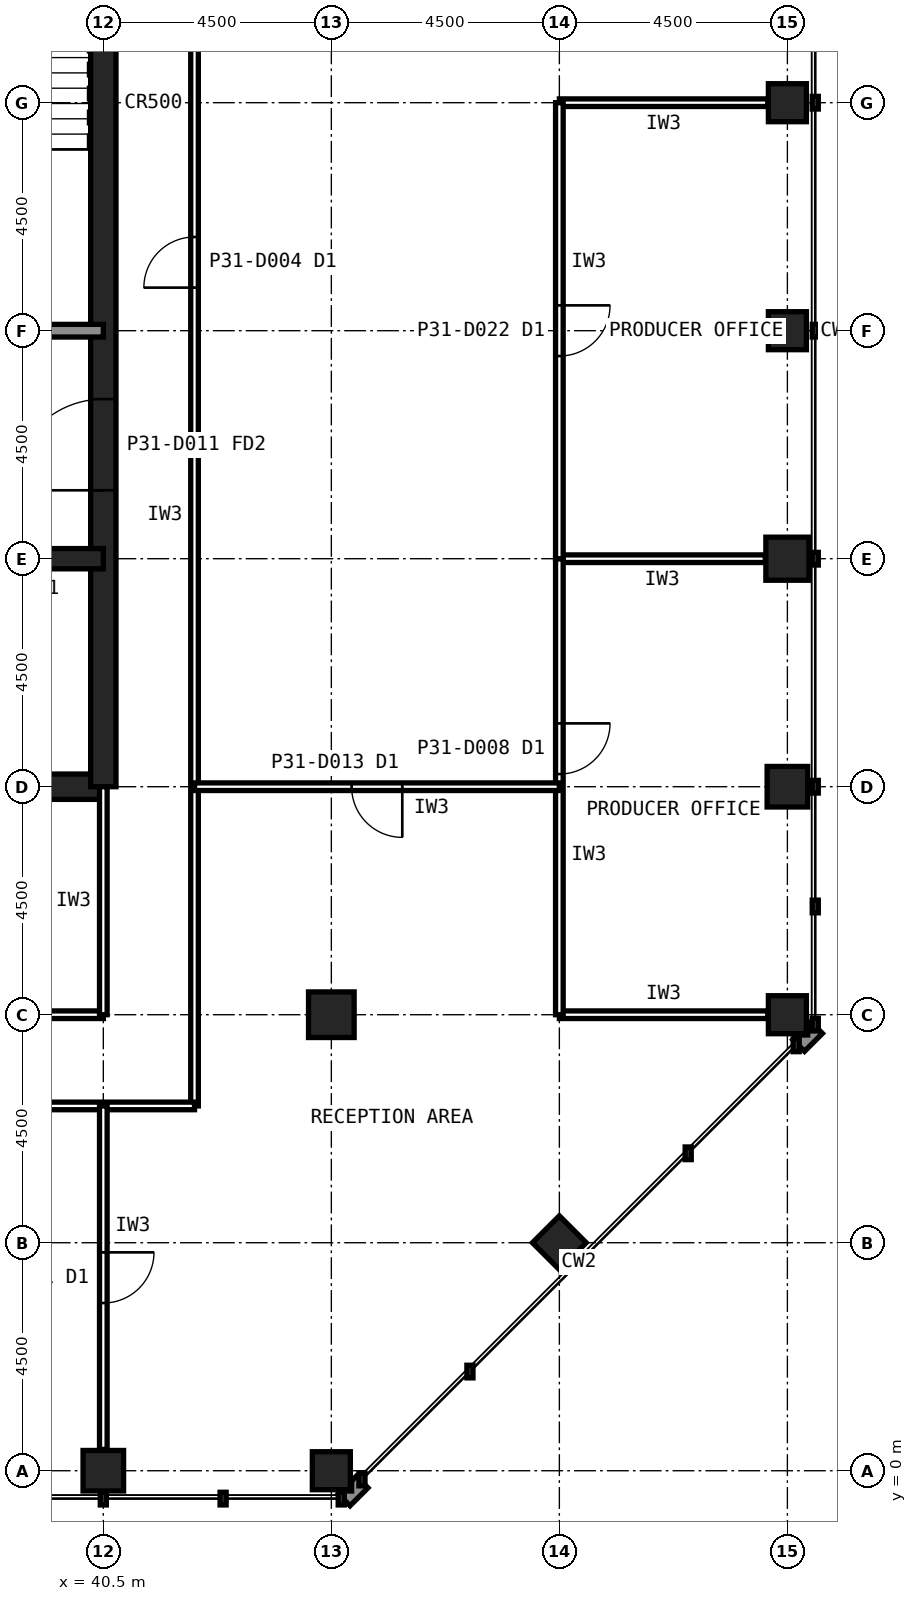
"""IFC4 building model, lengths in metres.
Left out: names, types, materials, properties, quantities, classifications, styles, units other than length and angle.
Written with IfcOpenShell. Run it as: python <this file> out.ifc"""

import sys

from ifc_helpers import new_model, si_unit, direction, frame, frame_2d, origin, origin_2d, place, context, subcontext, project, spatial, rectangle, hollow_rectangle, extrude, element, fill, save


model = new_model("IFC4")
c1 = context("Model", 3, precision=1e-05, world=origin(), true_north=direction((0.0, 1.0)))
c2 = subcontext(c1, "Body", "Model", "MODEL_VIEW")
j1 = project(units=[si_unit("LENGTHUNIT", "METRE"), si_unit("PLANEANGLEUNIT", "RADIAN")], contexts=[c1])
p1 = place(None, origin())
s1 = spatial("IfcSite", under=j1, at=p1, CompositionType="ELEMENT")
p2 = place(p1, origin())
s2 = spatial("IfcBuilding", under=s1, at=p2, CompositionType="ELEMENT")
p3 = place(p2, frame((0.0, 0.0, 135.6)))
s3 = spatial("IfcBuildingStorey", under=s2, at=p3, CompositionType="ELEMENT", Elevation=135.6)
p4 = place(p3, frame((40.5, 0.0, 0.0), z_axis=(0.0, 0.0, 1.0), x_axis=(1.0, 0.0, 0.0)))
e1 = element("IfcColumn", 1, at=p4, inside=s3, PredefinedType="COLUMN", context=c2, shape_type="SweptSolid", body=[
    extrude(hollow_rectangle(XDim=0.8, YDim=0.8, WallThickness=0.045, at=origin_2d()), origin(), (0.0, 0.0, 1.0), 4.0),
])
for number, where, z_axis, x_axis in (
    (2, (45.0, 0.0, 0.0), (0.0, 0.0, 1.0), (1.0, 0.0, 0.0)),
    (3, (54.0, 9.0, 0.0), (0.0, 0.0, 1.0), (1.0, 0.0, 0.0)),
):
    element("IfcColumn", number, at=place(p3, frame(where, z_axis=z_axis, x_axis=x_axis)), inside=s3, PredefinedType="COLUMN", context=c2, shape_type="SweptSolid", body=[
        extrude(hollow_rectangle(XDim=0.75, YDim=0.75, WallThickness=0.04, at=origin_2d()), origin(), (0.0, 0.0, 1.0), 4.0),
    ])
p5 = place(p3, frame((54.0, 13.5, 0.0), z_axis=(0.0, 0.0, 1.0), x_axis=(1.0, 0.0, 0.0)))
e4 = element("IfcColumn", 4, at=p5, inside=s3, PredefinedType="COLUMN", context=c2, shape_type="SweptSolid", body=[
    extrude(hollow_rectangle(XDim=0.8, YDim=0.8, WallThickness=0.045, at=origin_2d()), origin(), (0.0, 0.0, 1.0), 4.0),
])
p6 = place(p3, frame((54.0, 18.0, 0.0), z_axis=(0.0, 0.0, 1.0), x_axis=(1.0, 0.0, 0.0)))
e5 = element("IfcColumn", 5, at=p6, inside=s3, PredefinedType="COLUMN", context=c2, shape_type="SweptSolid", body=[
    extrude(hollow_rectangle(XDim=0.85, YDim=0.85, WallThickness=0.05, at=origin_2d()), origin(), (0.0, 0.0, 1.0), 4.0),
])
for number, where, z_axis, x_axis in (
    (6, (54.0, 22.5, 0.0), (0.0, 0.0, 1.0), (1.0, 0.0, 0.0)),
    (7, (54.0, 27.0, 0.0), (0.0, 0.0, 1.0), (1.0, 0.0, 0.0)),
    (8, (49.5, 4.5, 0.0), (0.0, 0.0, 1.0), (0.707, 0.707, 0.0)),
):
    element("IfcColumn", number, at=place(p3, frame(where, z_axis=z_axis, x_axis=x_axis)), inside=s3, PredefinedType="COLUMN", context=c2, shape_type="SweptSolid", body=[
        extrude(hollow_rectangle(XDim=0.75, YDim=0.75, WallThickness=0.04, at=origin_2d()), origin(), (0.0, 0.0, 1.0), 4.0),
    ])
p7 = place(p3, frame((45.0, 9.0, 0.0), z_axis=(0.0, 0.0, 1.0), x_axis=(1.0, 0.0, 0.0)))
e9 = element("IfcColumn", 9, at=p7, inside=s3, PredefinedType="COLUMN", context=c2, shape_type="SweptSolid", body=[
    extrude(hollow_rectangle(XDim=0.9, YDim=0.9, WallThickness=0.063, at=origin_2d()), origin(), (0.0, 0.0, 1.0), 4.0),
])
p8 = place(p3, frame((13.5, 13.5, 0.0), z_axis=(0.0, 0.0, 1.0), x_axis=(1.0, 0.0, 0.0)))
e10 = element("IfcWall", 10, at=p8, inside=s3, PredefinedType="SHEAR", context=c2, shape_type="SweptSolid", body=[
    extrude(rectangle(XDim=27.0, YDim=0.5, at=frame_2d((13.5, 0.0))), origin(), (0.0, 0.0, 1.0), 4.0),
])
p9 = place(p3, frame((40.5, 13.5, 0.0), z_axis=(0.0, 0.0, 1.0), x_axis=(0.0, 1.0, 0.0)))
e11 = element("IfcWall", 11, at=p9, inside=s3, PredefinedType="SHEAR", context=c2, shape_type="SweptSolid", body=[
    extrude(rectangle(XDim=27.0, YDim=0.5, at=frame_2d((13.5, 0.0))), origin(), (0.0, 0.0, 1.0), 4.0),
])
p10 = place(p9, frame((5.85, 0.0, 0.0)))
e12 = element("IfcOpeningElement", 12, at=p10, cuts=e11, PredefinedType="OPENING", context=c2, shape_type="SweptSolid", body=[
    extrude(rectangle(XDim=1.8, YDim=2.1, at=frame_2d((0.9, 1.05))), frame((0.0, 0.26, 0.0), z_axis=(0.0, -1.0, 0.0), x_axis=(1.0, 0.0, 0.0)), (0.0, 0.0, 1.0), 0.52),
])
p11 = place(p9, frame((19.65, 0.0, 0.0)))
e13 = element("IfcOpeningElement", 13, at=p11, cuts=e11, PredefinedType="OPENING", context=c2, shape_type="SweptSolid", body=[
    extrude(rectangle(XDim=1.2, YDim=2.1, at=frame_2d((0.6, 1.05))), frame((0.0, 0.26, 0.0), z_axis=(0.0, -1.0, 0.0), x_axis=(1.0, 0.0, 0.0)), (0.0, 0.0, 1.0), 0.52),
])
p12 = place(p3, frame((13.5, 18.0, 0.0), z_axis=(0.0, 0.0, 1.0), x_axis=(1.0, 0.0, 0.0)))
e14 = element("IfcWall", 14, at=p12, inside=s3, PredefinedType="SHEAR", context=c2, shape_type="SweptSolid", body=[
    extrude(rectangle(XDim=27.0, YDim=0.4, at=frame_2d((13.5, 0.0))), origin(), (0.0, 0.0, 1.0), 4.0),
])
p13 = place(p12, frame((24.3, 0.0, 0.0)))
e15 = element("IfcOpeningElement", 15, at=p13, cuts=e14, PredefinedType="OPENING", context=c2, shape_type="SweptSolid", body=[
    extrude(rectangle(XDim=0.9, YDim=2.1, at=frame_2d((0.45, 1.05))), frame((0.0, 0.21, 0.0), z_axis=(0.0, -1.0, 0.0), x_axis=(1.0, 0.0, 0.0)), (0.0, 0.0, 1.0), 0.42),
])
p14 = place(p12, frame((5.45, 0.0, 0.0)))
e16 = element("IfcOpeningElement", 16, at=p14, cuts=e14, PredefinedType="OPENING", context=c2, shape_type="SweptSolid", body=[
    extrude(rectangle(XDim=1.1, YDim=2.1, at=frame_2d((0.55, 1.05))), frame((0.0, 0.21, 0.0), z_axis=(0.0, -1.0, 0.0), x_axis=(1.0, 0.0, 0.0)), (0.0, 0.0, 1.0), 0.42),
])
p15 = place(p12, frame((8.45, 0.0, 0.0)))
e17 = element("IfcOpeningElement", 17, at=p15, cuts=e14, PredefinedType="OPENING", context=c2, shape_type="SweptSolid", body=[
    extrude(rectangle(XDim=1.1, YDim=2.1, at=frame_2d((0.55, 1.05))), frame((0.0, 0.21, 0.0), z_axis=(0.0, -1.0, 0.0), x_axis=(1.0, 0.0, 0.0)), (0.0, 0.0, 1.0), 0.42),
])
p16 = place(p12, frame((11.45, 0.0, 0.0)))
e18 = element("IfcOpeningElement", 18, at=p16, cuts=e14, PredefinedType="OPENING", context=c2, shape_type="SweptSolid", body=[
    extrude(rectangle(XDim=1.1, YDim=2.1, at=frame_2d((0.55, 1.05))), frame((0.0, 0.21, 0.0), z_axis=(0.0, -1.0, 0.0), x_axis=(1.0, 0.0, 0.0)), (0.0, 0.0, 1.0), 0.42),
])
p17 = place(p12, frame((14.45, 0.0, 0.0)))
e19 = element("IfcOpeningElement", 19, at=p17, cuts=e14, PredefinedType="OPENING", context=c2, shape_type="SweptSolid", body=[
    extrude(rectangle(XDim=1.1, YDim=2.1, at=frame_2d((0.55, 1.05))), frame((0.0, 0.21, 0.0), z_axis=(0.0, -1.0, 0.0), x_axis=(1.0, 0.0, 0.0)), (0.0, 0.0, 1.0), 0.42),
])
p18 = place(p12, frame((17.45, 0.0, 0.0)))
e20 = element("IfcOpeningElement", 20, at=p18, cuts=e14, PredefinedType="OPENING", context=c2, shape_type="SweptSolid", body=[
    extrude(rectangle(XDim=1.1, YDim=2.1, at=frame_2d((0.55, 1.05))), frame((0.0, 0.21, 0.0), z_axis=(0.0, -1.0, 0.0), x_axis=(1.0, 0.0, 0.0)), (0.0, 0.0, 1.0), 0.42),
])
p19 = place(p12, frame((20.45, 0.0, 0.0)))
e21 = element("IfcOpeningElement", 21, at=p19, cuts=e14, PredefinedType="OPENING", context=c2, shape_type="SweptSolid", body=[
    extrude(rectangle(XDim=1.1, YDim=2.1, at=frame_2d((0.55, 1.05))), frame((0.0, 0.21, 0.0), z_axis=(0.0, -1.0, 0.0), x_axis=(1.0, 0.0, 0.0)), (0.0, 0.0, 1.0), 0.42),
])
p20 = place(p12, frame((1.6, 0.0, 0.0)))
e22 = element("IfcOpeningElement", 22, at=p20, cuts=e14, PredefinedType="OPENING", context=c2, shape_type="SweptSolid", body=[
    extrude(rectangle(XDim=1.3, YDim=2.2, at=frame_2d((0.65, 1.1))), frame((0.0, 0.21, 0.0), z_axis=(0.0, -1.0, 0.0), x_axis=(1.0, 0.0, 0.0)), (0.0, 0.0, 1.0), 0.42),
])
p21 = place(p3, frame((13.5, 22.5, 0.0), z_axis=(0.0, 0.0, 1.0), x_axis=(1.0, 0.0, 0.0)))
e23 = element("IfcWall", 23, at=p21, inside=s3, PredefinedType="SOLIDWALL", context=c2, shape_type="SweptSolid", body=[
    extrude(rectangle(XDim=27.0, YDim=0.25, at=frame_2d((13.5, 0.0))), origin(), (0.0, 0.0, 1.0), 3.84),
])
p22 = place(p21, frame((1.65, 0.0, 0.0)))
e24 = element("IfcOpeningElement", 24, at=p22, cuts=e23, PredefinedType="OPENING", context=c2, shape_type="SweptSolid", body=[
    extrude(rectangle(XDim=1.2, YDim=2.1, at=frame_2d((0.6, 1.05))), frame((0.0, 0.135, 0.0), z_axis=(0.0, -1.0, 0.0), x_axis=(1.0, 0.0, 0.0)), (0.0, 0.0, 1.0), 0.27),
])
p23 = place(p21, frame((6.025, 0.0, 0.0)))
e25 = element("IfcOpeningElement", 25, at=p23, cuts=e23, PredefinedType="OPENING", context=c2, shape_type="SweptSolid", body=[
    extrude(rectangle(XDim=1.0, YDim=2.1, at=frame_2d((0.5, 1.05))), frame((0.0, 0.135, 0.0), z_axis=(0.0, -1.0, 0.0), x_axis=(1.0, 0.0, 0.0)), (0.0, 0.0, 1.0), 0.27),
])
p24 = place(p21, frame((10.525, 0.0, 0.0)))
e26 = element("IfcOpeningElement", 26, at=p24, cuts=e23, PredefinedType="OPENING", context=c2, shape_type="SweptSolid", body=[
    extrude(rectangle(XDim=1.0, YDim=2.1, at=frame_2d((0.5, 1.05))), frame((0.0, 0.135, 0.0), z_axis=(0.0, -1.0, 0.0), x_axis=(1.0, 0.0, 0.0)), (0.0, 0.0, 1.0), 0.27),
])
p25 = place(p21, frame((19.75, 0.0, 0.0)))
e27 = element("IfcOpeningElement", 27, at=p25, cuts=e23, PredefinedType="OPENING", context=c2, shape_type="SweptSolid", body=[
    extrude(rectangle(XDim=1.0, YDim=2.1, at=frame_2d((0.5, 1.05))), frame((0.0, 0.135, 0.0), z_axis=(0.0, -1.0, 0.0), x_axis=(1.0, 0.0, 0.0)), (0.0, 0.0, 1.0), 0.27),
])
p26 = place(p21, frame((15.05, 0.0, 0.0)))
e28 = element("IfcOpeningElement", 28, at=p26, cuts=e23, PredefinedType="OPENING", context=c2, shape_type="SweptSolid", body=[
    extrude(rectangle(XDim=1.4, YDim=2.4, at=frame_2d((0.7, 1.2))), frame((0.0, 0.135, 0.0), z_axis=(0.0, -1.0, 0.0), x_axis=(1.0, 0.0, 0.0)), (0.0, 0.0, 1.0), 0.27),
])
p27 = place(p3, frame((42.3, 7.2, 0.0), z_axis=(0.0, 0.0, 1.0), x_axis=(0.0, 1.0, 0.0)))
e29 = element("IfcWall", 29, at=p27, inside=s3, PredefinedType="PARTITIONING", context=c2, shape_type="SweptSolid", body=[
    extrude(rectangle(XDim=33.3, YDim=0.15, at=frame_2d((16.65, 0.0))), origin(), (0.0, 0.0, 1.0), 3.84),
])
p28 = place(p27, frame((16.15, 0.0, 0.0)))
e30 = element("IfcOpeningElement", 30, at=p28, cuts=e29, PredefinedType="OPENING", context=c2, shape_type="SweptSolid", body=[
    extrude(rectangle(XDim=1.0, YDim=2.1, at=frame_2d((0.5, 1.05))), frame((0.0, 0.085, 0.0), z_axis=(0.0, -1.0, 0.0), x_axis=(1.0, 0.0, 0.0)), (0.0, 0.0, 1.0), 0.17),
])
p29 = place(p3, frame((11.7, 7.2, 0.0), z_axis=(0.0, 0.0, 1.0), x_axis=(1.0, 0.0, 0.0)))
e31 = element("IfcWall", 31, at=p29, inside=s3, PredefinedType="PARTITIONING", context=c2, shape_type="SweptSolid", body=[
    extrude(rectangle(XDim=30.6, YDim=0.15, at=frame_2d((15.3, 0.0))), origin(), (0.0, 0.0, 1.0), 3.84),
])
p30 = place(p29, frame((14.8, 0.0, 0.0)))
e32 = element("IfcOpeningElement", 32, at=p30, cuts=e31, PredefinedType="OPENING", context=c2, shape_type="SweptSolid", body=[
    extrude(rectangle(XDim=1.0, YDim=2.1, at=frame_2d((0.5, 1.05))), frame((0.0, 0.085, 0.0), z_axis=(0.0, -1.0, 0.0), x_axis=(1.0, 0.0, 0.0)), (0.0, 0.0, 1.0), 0.17),
])
p31 = place(p3, frame((31.5, 9.0, 0.0), z_axis=(0.0, 0.0, 1.0), x_axis=(1.0, 0.0, 0.0)))
e33 = element("IfcWall", 33, at=p31, inside=s3, PredefinedType="PARTITIONING", context=c2, shape_type="SweptSolid", body=[
    extrude(rectangle(XDim=9.0, YDim=0.15, at=frame_2d((4.5, 0.0))), origin(), (0.0, 0.0, 1.0), 3.84),
])
p32 = place(p31, frame((4.0, 0.0, 0.0)))
e34 = element("IfcOpeningElement", 34, at=p32, cuts=e33, PredefinedType="OPENING", context=c2, shape_type="SweptSolid", body=[
    extrude(rectangle(XDim=1.0, YDim=2.1, at=frame_2d((0.5, 1.05))), frame((0.0, 0.085, 0.0), z_axis=(0.0, -1.0, 0.0), x_axis=(1.0, 0.0, 0.0)), (0.0, 0.0, 1.0), 0.17),
])
p33 = place(p3, frame((40.5, 9.0, 0.0), z_axis=(0.0, 0.0, 1.0), x_axis=(0.0, 1.0, 0.0)))
e35 = element("IfcWall", 35, at=p33, inside=s3, PredefinedType="PARTITIONING", context=c2, shape_type="SweptSolid", body=[
    extrude(rectangle(XDim=4.5, YDim=0.15, at=frame_2d((2.25, 0.0))), origin(), (0.0, 0.0, 1.0), 2.989),
])
p34 = place(p3, frame((49.5, 9.0, 0.0), z_axis=(0.0, 0.0, 1.0), x_axis=(1.0, 0.0, 0.0)))
e36 = element("IfcWall", 36, at=p34, inside=s3, PredefinedType="PARTITIONING", context=c2, shape_type="SweptSolid", body=[
    extrude(rectangle(XDim=4.115, YDim=0.15, at=frame_2d((2.058, 0.0))), origin(), (0.0, 0.0, 1.0), 3.229),
])
p35 = place(p3, frame((53.565, 18.0, 0.0), z_axis=(0.0, 0.0, 1.0), x_axis=(-1.0, 0.0, 0.0)))
e37 = element("IfcWall", 37, at=p35, inside=s3, PredefinedType="PARTITIONING", context=c2, shape_type="SweptSolid", body=[
    extrude(rectangle(XDim=4.065, YDim=0.15, at=frame_2d((2.032, 0.0))), origin(), (0.0, 0.0, 1.0), 2.989),
])
p36 = place(p3, frame((49.5, 18.0, 0.0), z_axis=(0.0, 0.0, 1.0), x_axis=(0.0, -1.0, 0.0)))
e38 = element("IfcWall", 38, at=p36, inside=s3, PredefinedType="PARTITIONING", context=c2, shape_type="SweptSolid", body=[
    extrude(rectangle(XDim=9.0, YDim=0.15, at=frame_2d((4.5, 0.0))), origin(), (0.0, 0.0, 1.0), 3.84),
])
p37 = place(p36, frame((3.25, 0.0, 0.0)))
e39 = element("IfcOpeningElement", 39, at=p37, cuts=e38, PredefinedType="OPENING", context=c2, shape_type="SweptSolid", body=[
    extrude(rectangle(XDim=1.0, YDim=2.1, at=frame_2d((0.5, 1.05))), frame((0.0, 0.085, 0.0), z_axis=(0.0, -1.0, 0.0), x_axis=(1.0, 0.0, 0.0)), (0.0, 0.0, 1.0), 0.17),
])
p38 = place(p3, frame((53.615, 27.0, 0.0), z_axis=(0.0, 0.0, 1.0), x_axis=(-1.0, 0.0, 0.0)))
e40 = element("IfcWall", 40, at=p38, inside=s3, PredefinedType="PARTITIONING", context=c2, shape_type="SweptSolid", body=[
    extrude(rectangle(XDim=4.115, YDim=0.15, at=frame_2d((2.058, 0.0))), origin(), (0.0, 0.0, 1.0), 2.989),
])
p39 = place(p3, frame((49.5, 27.0, 0.0), z_axis=(0.0, 0.0, 1.0), x_axis=(0.0, -1.0, 0.0)))
e41 = element("IfcWall", 41, at=p39, inside=s3, PredefinedType="PARTITIONING", context=c2, shape_type="SweptSolid", body=[
    extrude(rectangle(XDim=9.0, YDim=0.15, at=frame_2d((4.5, 0.0))), origin(), (0.0, 0.0, 1.0), 3.84),
])
p40 = place(p39, frame((4.0, 0.0, 0.0)))
e42 = element("IfcOpeningElement", 42, at=p40, cuts=e41, PredefinedType="OPENING", context=c2, shape_type="SweptSolid", body=[
    extrude(rectangle(XDim=1.0, YDim=2.1, at=frame_2d((0.5, 1.05))), frame((0.0, 0.085, 0.0), z_axis=(0.0, -1.0, 0.0), x_axis=(1.0, 0.0, 0.0)), (0.0, 0.0, 1.0), 0.17),
])
p41 = place(p3, frame((49.5, 13.5, 0.0), z_axis=(0.0, 0.0, 1.0), x_axis=(-1.0, 0.0, 0.0)))
e43 = element("IfcWall", 43, at=p41, inside=s3, PredefinedType="PARTITIONING", context=c2, shape_type="SweptSolid", body=[
    extrude(rectangle(XDim=7.2, YDim=0.15, at=frame_2d((3.6, 0.0))), origin(), (0.0, 0.0, 1.0), 2.989),
])
p42 = place(p41, frame((3.1, 0.0, 0.0)))
e44 = element("IfcOpeningElement", 44, at=p42, cuts=e43, PredefinedType="OPENING", context=c2, shape_type="SweptSolid", body=[
    extrude(rectangle(XDim=1.0, YDim=2.1, at=frame_2d((0.5, 1.05))), frame((0.0, 0.085, 0.0), z_axis=(0.0, -1.0, 0.0), x_axis=(1.0, 0.0, 0.0)), (0.0, 0.0, 1.0), 0.17),
])
p43 = place(p3, frame((40.5, 7.2, 0.0), z_axis=(0.0, 0.0, 1.0), x_axis=(0.0, -1.0, 0.0)))
e45 = element("IfcWall", 45, at=p43, inside=s3, PredefinedType="PARTITIONING", context=c2, shape_type="SweptSolid", body=[
    extrude(rectangle(XDim=6.78, YDim=0.15, at=frame_2d((3.39, 0.0))), origin(), (0.0, 0.0, 1.0), 2.989),
])
p44 = place(p43, frame((2.89, 0.0, 0.0)))
e46 = element("IfcOpeningElement", 46, at=p44, cuts=e45, PredefinedType="OPENING", context=c2, shape_type="SweptSolid", body=[
    extrude(rectangle(XDim=1.0, YDim=2.1, at=frame_2d((0.5, 1.05))), frame((0.0, 0.085, 0.0), z_axis=(0.0, -1.0, 0.0), x_axis=(1.0, 0.0, 0.0)), (0.0, 0.0, 1.0), 0.17),
])
p45 = place(p10, origin())
e47 = element("IfcDoor", 47, at=p45, inside=s3, OperationType="SINGLE_SWING_LEFT", PredefinedType="DOOR", context=c2, shape_type="SweptSolid", body=[
    extrude(rectangle(XDim=1.8, YDim=2.1, at=frame_2d((0.9, 1.05))), frame((0.0, 0.025, 0.0), z_axis=(0.0, -1.0, 0.0), x_axis=(1.0, 0.0, 0.0)), (0.0, 0.0, 1.0), 0.05),
])
fill(e12, e47)
p46 = place(p28, origin())
e48 = element("IfcDoor", 48, at=p46, inside=s3, OperationType="SINGLE_SWING_LEFT", PredefinedType="DOOR", context=c2, shape_type="SweptSolid", body=[
    extrude(rectangle(XDim=1.0, YDim=2.1, at=frame_2d((0.5, 1.05))), frame((0.0, 0.025, 0.0), z_axis=(0.0, -1.0, 0.0), x_axis=(1.0, 0.0, 0.0)), (0.0, 0.0, 1.0), 0.05),
])
fill(e30, e48)
p47 = place(p37, origin())
e49 = element("IfcDoor", 49, at=p47, inside=s3, OperationType="SINGLE_SWING_LEFT", PredefinedType="DOOR", context=c2, shape_type="SweptSolid", body=[
    extrude(rectangle(XDim=1.0, YDim=2.1, at=frame_2d((0.5, 1.05))), frame((0.0, 0.025, 0.0), z_axis=(0.0, -1.0, 0.0), x_axis=(1.0, 0.0, 0.0)), (0.0, 0.0, 1.0), 0.05),
])
fill(e39, e49)
p48 = place(p40, origin())
e50 = element("IfcDoor", 50, at=p48, inside=s3, OperationType="SINGLE_SWING_LEFT", PredefinedType="DOOR", context=c2, shape_type="SweptSolid", body=[
    extrude(rectangle(XDim=1.0, YDim=2.1, at=frame_2d((0.5, 1.05))), frame((0.0, 0.025, 0.0), z_axis=(0.0, -1.0, 0.0), x_axis=(1.0, 0.0, 0.0)), (0.0, 0.0, 1.0), 0.05),
])
fill(e42, e50)
p49 = place(p42, origin())
e51 = element("IfcDoor", 51, at=p49, inside=s3, OperationType="SINGLE_SWING_LEFT", PredefinedType="DOOR", context=c2, shape_type="SweptSolid", body=[
    extrude(rectangle(XDim=1.0, YDim=2.1, at=frame_2d((0.5, 1.05))), frame((0.0, 0.025, 0.0), z_axis=(0.0, -1.0, 0.0), x_axis=(1.0, 0.0, 0.0)), (0.0, 0.0, 1.0), 0.05),
])
fill(e44, e51)
p50 = place(p44, origin())
e52 = element("IfcDoor", 52, at=p50, inside=s3, OperationType="SINGLE_SWING_LEFT", PredefinedType="DOOR", context=c2, shape_type="SweptSolid", body=[
    extrude(rectangle(XDim=1.0, YDim=2.1, at=frame_2d((0.5, 1.05))), frame((0.0, 0.025, 0.0), z_axis=(0.0, -1.0, 0.0), x_axis=(1.0, 0.0, 0.0)), (0.0, 0.0, 1.0), 0.05),
])
fill(e46, e52)
save(model, sys.argv[1])
